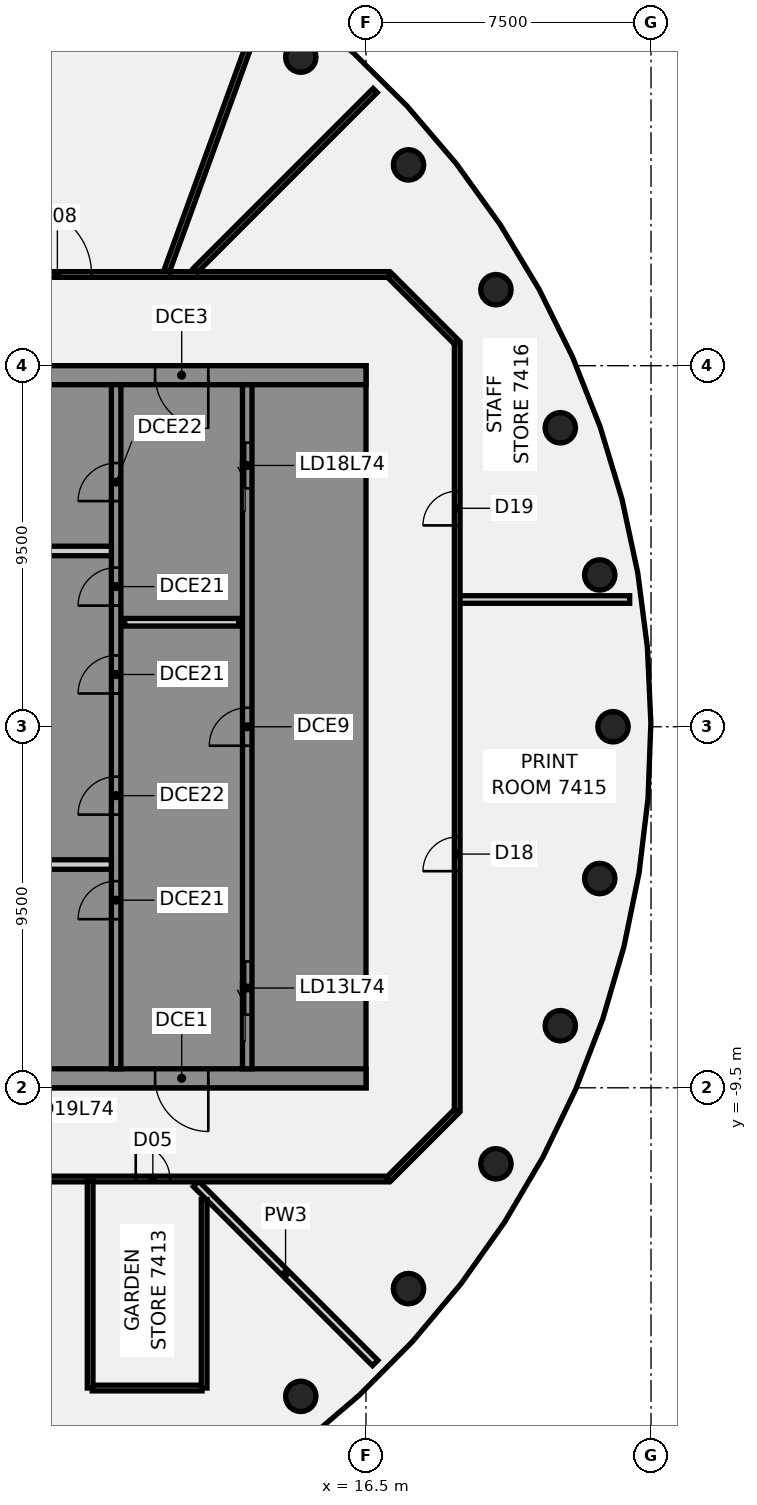
"""IFC4 building model, lengths in metres.
Left out: names, types, materials, properties, quantities, classifications, styles, units other than length and angle.
Written with IfcOpenShell. Run it as: python <this file> out.ifc"""

import sys

from ifc_helpers import new_model, si_unit, direction, frame, frame_2d, origin, origin_2d, place, context, subcontext, project, spatial, polyline, rectangle, circle, outline, extrude, element, fill, save


model = new_model("IFC4")
c1 = context("Model", 3, precision=1e-05, world=origin(), true_north=direction((0.0, 1.0)))
c2 = subcontext(c1, "Body", "Model", "MODEL_VIEW")
j1 = project(units=[si_unit("LENGTHUNIT", "METRE"), si_unit("PLANEANGLEUNIT", "RADIAN")], contexts=[c1])
p1 = place(None, origin())
s1 = spatial("IfcSite", under=j1, at=p1, CompositionType="ELEMENT")
p2 = place(p1, origin())
s2 = spatial("IfcBuilding", under=s1, at=p2, CompositionType="ELEMENT")
p3 = place(p2, frame((0.0, 0.0, 299.4)))
s3 = spatial("IfcBuildingStorey", under=s2, at=p3, CompositionType="ELEMENT", Elevation=299.4)
for number, where, z_axis, x_axis in (
    (1, (23.0, 0.0, -0.25), (0.0, 0.0, 1.0), (1.0, 0.0, 0.0)),
    (2, (22.651, 3.994, -0.25), (0.0, 0.0, 1.0), (1.0, 0.0, 0.0)),
    (3, (21.613, 7.866, -0.25), (0.0, 0.0, 1.0), (1.0, 0.0, 0.0)),
    (4, (19.919, 11.5, -0.25), (0.0, 0.0, 1.0), (1.0, 0.0, 0.0)),
    (5, (17.619, 14.784, -0.25), (0.0, 0.0, 1.0), (1.0, 0.0, 0.0)),
    (6, (14.784, 17.619, -0.25), (0.0, 0.0, 1.0), (1.0, 0.0, 0.0)),
    (7, (14.784, -17.619, -0.25), (0.0, 0.0, 1.0), (1.0, 0.0, 0.0)),
    (8, (17.619, -14.784, -0.25), (0.0, 0.0, 1.0), (1.0, 0.0, 0.0)),
    (9, (19.919, -11.5, -0.25), (0.0, 0.0, 1.0), (1.0, 0.0, 0.0)),
    (10, (21.613, -7.866, -0.25), (0.0, 0.0, 1.0), (1.0, 0.0, 0.0)),
    (11, (22.651, -3.994, -0.25), (0.0, 0.0, 1.0), (1.0, 0.0, 0.0)),
):
    element("IfcColumn", number, at=place(p3, frame(where, z_axis=z_axis, x_axis=x_axis)), inside=s3, PredefinedType="COLUMN", context=c2, shape_type="SweptSolid", body=[
        extrude(circle(Radius=0.4, at=origin_2d()), origin(), (0.0, 0.0, 1.0), 6.07),
    ])
p4 = place(p3, frame((12.027, -12.027, 0.0), z_axis=(0.0, 0.0, 1.0), x_axis=(0.707106781187, -0.707106781187, 0.0)))
e12 = element("IfcWall", 12, at=p4, inside=s3, PredefinedType="PARTITIONING", context=c2, shape_type="SweptSolid", body=[
    extrude(rectangle(XDim=6.665, YDim=0.2, at=frame_2d((3.333, 0.0))), origin(), (0.0, 0.0, 1.0), 5.02),
])
p5 = place(p3, frame((17.128, 11.872, 0.0), z_axis=(0.0, 0.0, 1.0), x_axis=(0.707106781187, -0.707106781187, 0.0)))
e13 = element("IfcWall", 13, at=p5, inside=s3, PredefinedType="PARTITIONING", context=c2, shape_type="SweptSolid", body=[
    extrude(rectangle(XDim=2.465, YDim=0.15, at=frame_2d((1.232, 0.0))), origin(), (0.0, 0.0, 1.0), 5.02),
])
p6 = place(p3, frame((-17.1, -11.9, 0.0), z_axis=(0.0, 0.0, 1.0), x_axis=(1.0, 0.0, 0.0)))
e14 = element("IfcWall", 14, at=p6, inside=s3, PredefinedType="PARTITIONING", context=c2, shape_type="SweptSolid", body=[
    extrude(rectangle(XDim=34.165, YDim=0.15, at=frame_2d((17.083, 0.0))), origin(), (0.0, 0.0, 1.0), 5.02),
])
p7 = place(p6, frame((7.45, 0.0, 0.0)))
e15 = element("IfcOpeningElement", 15, at=p7, cuts=e14, PredefinedType="OPENING", context=c2, shape_type="SweptSolid", body=[
    extrude(rectangle(XDim=1.8, YDim=2.1, at=frame_2d((0.9, 1.05))), frame((0.0, 0.085, 0.0), z_axis=(0.0, -1.0, 0.0), x_axis=(1.0, 0.0, 0.0)), (0.0, 0.0, 1.0), 0.17),
])
p8 = place(p6, frame((27.541, 0.0, 0.0)))
e16 = element("IfcOpeningElement", 16, at=p8, cuts=e14, PredefinedType="OPENING", context=c2, shape_type="SweptSolid", body=[
    extrude(rectangle(XDim=0.9, YDim=2.1, at=frame_2d((0.45, 1.05))), frame((0.0, 0.085, 0.0), z_axis=(0.0, -1.0, 0.0), x_axis=(1.0, 0.0, 0.0)), (0.0, 0.0, 1.0), 0.17),
])
p9 = place(p6, frame((18.909, 0.0, 0.0)))
e17 = element("IfcOpeningElement", 17, at=p9, cuts=e14, PredefinedType="OPENING", context=c2, shape_type="SweptSolid", body=[
    extrude(rectangle(XDim=1.8, YDim=2.1, at=frame_2d((0.9, 1.05))), frame((0.0, 0.085, 0.0), z_axis=(0.0, -1.0, 0.0), x_axis=(1.0, 0.0, 0.0)), (0.0, 0.0, 1.0), 0.17),
])
p10 = place(p6, frame((2.85, 0.0, 0.0)))
e18 = element("IfcOpeningElement", 18, at=p10, cuts=e14, PredefinedType="OPENING", context=c2, shape_type="SweptSolid", body=[
    extrude(rectangle(XDim=0.9, YDim=2.1, at=frame_2d((0.45, 1.05))), frame((0.0, 0.085, 0.0), z_axis=(0.0, -1.0, 0.0), x_axis=(1.0, 0.0, 0.0)), (0.0, 0.0, 1.0), 0.17),
])
p11 = place(p3, frame((-17.065, 11.9, 0.0), z_axis=(0.0, 0.0, 1.0), x_axis=(1.0, 0.0, 0.0)))
e19 = element("IfcWall", 19, at=p11, inside=s3, PredefinedType="PARTITIONING", context=c2, shape_type="SweptSolid", body=[
    extrude(rectangle(XDim=34.165, YDim=0.15, at=frame_2d((17.083, 0.0))), origin(), (0.0, 0.0, 1.0), 5.02),
])
p12 = place(p11, frame((24.544, 0.0, 0.0)))
e20 = element("IfcOpeningElement", 20, at=p12, cuts=e19, PredefinedType="OPENING", context=c2, shape_type="SweptSolid", body=[
    extrude(rectangle(XDim=1.8, YDim=2.1, at=frame_2d((0.9, 1.05))), frame((0.0, 0.085, 0.0), z_axis=(0.0, -1.0, 0.0), x_axis=(1.0, 0.0, 0.0)), (0.0, 0.0, 1.0), 0.17),
])
p13 = place(p11, frame((15.365, 0.0, 0.0)))
e21 = element("IfcOpeningElement", 21, at=p13, cuts=e19, PredefinedType="OPENING", context=c2, shape_type="SweptSolid", body=[
    extrude(rectangle(XDim=1.8, YDim=2.1, at=frame_2d((0.9, 1.05))), frame((0.0, 0.085, 0.0), z_axis=(0.0, -1.0, 0.0), x_axis=(1.0, 0.0, 0.0)), (0.0, 0.0, 1.0), 0.17),
])
p14 = place(p3, frame((9.296, -17.4, 0.0), z_axis=(0.0, 0.0, 1.0), x_axis=(1.0, 0.0, 0.0)))
e22 = element("IfcWall", 22, at=p14, inside=s3, PredefinedType="PARTITIONING", context=c2, shape_type="SweptSolid", body=[
    extrude(rectangle(XDim=2.89, YDim=0.15, at=frame_2d((1.445, 0.0))), origin(), (0.0, 0.0, 1.0), 5.02),
])
p15 = place(p3, frame((18.955, 3.348, 0.0), z_axis=(0.0, 0.0, 1.0), x_axis=(1.0, 0.0, 0.0)))
e23 = element("IfcWall", 23, at=p15, inside=s3, PredefinedType="PARTITIONING", context=c2, shape_type="SweptSolid", body=[
    extrude(rectangle(XDim=4.484, YDim=0.2, at=frame_2d((2.242, 0.0))), origin(), (0.0, 0.0, 1.0), 5.02),
])
p16 = place(p3, frame((12.01, 12.01, 0.0), z_axis=(0.0, 0.0, 1.0), x_axis=(0.707106781187, 0.707106781187, 0.0)))
e24 = element("IfcWall", 24, at=p16, inside=s3, PredefinedType="PARTITIONING", context=c2, shape_type="SweptSolid", body=[
    extrude(rectangle(XDim=6.691, YDim=0.15, at=frame_2d((3.345, 0.0))), origin(), (0.0, 0.0, 1.0), 5.02),
])
p17 = place(p3, frame((17.1, -11.9, 0.0), z_axis=(0.0, 0.0, 1.0), x_axis=(0.707106781187, 0.707106781187, 0.0)))
e25 = element("IfcWall", 25, at=p17, inside=s3, PredefinedType="PARTITIONING", context=c2, shape_type="SweptSolid", body=[
    extrude(rectangle(XDim=2.505, YDim=0.15, at=frame_2d((1.253, 0.0))), origin(), (0.0, 0.0, 1.0), 5.02),
])
p18 = place(p3, frame((11.254, 11.985, 0.0), z_axis=(0.0, 0.0, 1.0), x_axis=(0.341891443356, 0.939739453764, 0.0)))
e26 = element("IfcWall", 26, at=p18, inside=s3, PredefinedType="PARTITIONING", context=c2, shape_type="SweptSolid", body=[
    extrude(rectangle(XDim=7.662, YDim=0.15, at=frame_2d((3.831, 0.0))), origin(), (0.0, 0.0, 1.0), 5.02),
])
p19 = place(p3, frame((9.241, -17.4, 0.0), z_axis=(0.0, 0.0, 1.0), x_axis=(0.0, 1.0, 0.0)))
e27 = element("IfcWall", 27, at=p19, inside=s3, PredefinedType="PARTITIONING", context=c2, shape_type="SweptSolid", body=[
    extrude(rectangle(XDim=5.445, YDim=0.15, at=frame_2d((2.722, 0.0))), origin(), (0.0, 0.0, 1.0), 5.02),
])
p20 = place(p3, frame((12.241, -17.4, 0.0), z_axis=(0.0, 0.0, 1.0), x_axis=(0.0, 1.0, 0.0)))
e28 = element("IfcWall", 28, at=p20, inside=s3, PredefinedType="PARTITIONING", context=c2, shape_type="SweptSolid", body=[
    extrude(rectangle(XDim=4.959, YDim=0.15, at=frame_2d((2.479, 0.0))), origin(), (0.0, 0.0, 1.0), 5.02),
])
p21 = place(p3, frame((18.9, -10.1, 0.0), z_axis=(0.0, 0.0, 1.0), x_axis=(0.0, 1.0, 0.0)))
e29 = element("IfcWall", 29, at=p21, inside=s3, PredefinedType="PARTITIONING", context=c2, shape_type="SweptSolid", body=[
    extrude(rectangle(XDim=20.2, YDim=0.15, at=frame_2d((10.1, 0.0))), origin(), (0.0, 0.0, 1.0), 5.02),
])
p22 = place(p21, frame((6.3, 0.0, 0.0)))
e30 = element("IfcOpeningElement", 30, at=p22, cuts=e29, PredefinedType="OPENING", context=c2, shape_type="SweptSolid", body=[
    extrude(rectangle(XDim=0.9, YDim=2.1, at=frame_2d((0.45, 1.05))), frame((0.0, 0.085, 0.0), z_axis=(0.0, -1.0, 0.0), x_axis=(1.0, 0.0, 0.0)), (0.0, 0.0, 1.0), 0.17),
])
p23 = place(p21, frame((15.398, 0.0, 0.0)))
e31 = element("IfcOpeningElement", 31, at=p23, cuts=e29, PredefinedType="OPENING", context=c2, shape_type="SweptSolid", body=[
    extrude(rectangle(XDim=0.9, YDim=2.1, at=frame_2d((0.45, 1.05))), frame((0.0, 0.085, 0.0), z_axis=(0.0, -1.0, 0.0), x_axis=(1.0, 0.0, 0.0)), (0.0, 0.0, 1.0), 0.17),
])
p24 = place(p3, frame((16.5, -9.25, 0.0), z_axis=(0.0, 0.0, 1.0), x_axis=(-1.0, 0.0, 0.0)))
e32 = element("IfcWall", 32, at=p24, inside=s3, PredefinedType="SHEAR", context=c2, shape_type="SweptSolid", body=[
    extrude(rectangle(XDim=13.0, YDim=0.5, at=frame_2d((6.5, 0.0))), origin(), (0.0, 0.0, 1.0), 5.82),
])
p25 = place(p24, frame((4.15, 0.0, 0.0)))
e33 = element("IfcOpeningElement", 33, at=p25, cuts=e32, PredefinedType="OPENING", context=c2, shape_type="SweptSolid", body=[
    extrude(rectangle(XDim=1.4, YDim=2.1, at=frame_2d((0.7, 1.05))), frame((0.0, 0.26, 0.0), z_axis=(0.0, -1.0, 0.0), x_axis=(1.0, 0.0, 0.0)), (0.0, 0.0, 1.0), 0.52),
])
p26 = place(p24, frame((10.125, 0.0, 0.0)))
e34 = element("IfcOpeningElement", 34, at=p26, cuts=e32, PredefinedType="OPENING", context=c2, shape_type="SweptSolid", body=[
    extrude(rectangle(XDim=1.4, YDim=2.1, at=frame_2d((0.7, 1.05))), frame((0.0, 0.26, 0.0), z_axis=(0.0, -1.0, 0.0), x_axis=(1.0, 0.0, 0.0)), (0.0, 0.0, 1.0), 0.52),
])
p27 = place(p3, frame((16.5, 9.25, 0.0), z_axis=(0.0, 0.0, 1.0), x_axis=(-1.0, 0.0, 0.0)))
e35 = element("IfcWall", 35, at=p27, inside=s3, PredefinedType="SHEAR", context=c2, shape_type="SweptSolid", body=[
    extrude(rectangle(XDim=13.0, YDim=0.5, at=frame_2d((6.5, 0.0))), origin(), (0.0, 0.0, 1.0), 5.82),
])
p28 = place(p27, frame((4.15, 0.0, 0.0)))
e36 = element("IfcOpeningElement", 36, at=p28, cuts=e35, PredefinedType="OPENING", context=c2, shape_type="SweptSolid", body=[
    extrude(rectangle(XDim=1.4, YDim=2.1, at=frame_2d((0.7, 1.05))), frame((0.0, 0.26, 0.0), z_axis=(0.0, -1.0, 0.0), x_axis=(1.0, 0.0, 0.0)), (0.0, 0.0, 1.0), 0.52),
])
p29 = place(p3, frame((13.15, 2.75, 0.0), z_axis=(0.0, 0.0, 1.0), x_axis=(-1.0, 0.0, 0.0)))
e37 = element("IfcWall", 37, at=p29, inside=s3, PredefinedType="PARTITIONING", context=c2, shape_type="SweptSolid", body=[
    extrude(rectangle(XDim=3.0, YDim=0.2, at=frame_2d((1.5, 0.0))), origin(), (0.0, 0.0, 1.0), 5.82),
])
p30 = place(p3, origin())
e38 = element("IfcWall", 38, at=p30, inside=s3, PredefinedType="SHEAR", context=c2, shape_type="SweptSolid", body=[
    extrude(outline(polyline([(13.5, -8.125), (13.5, -9.0), (16.0, -9.0), (16.5, -9.0), (16.5, 9.0), (16.0, 9.0), (13.5, 9.0), (13.5, 8.125), (16.0, 8.125), (16.0, 5.625), (13.5, 5.625), (13.5, 5.375), (16.0, 5.375), (16.0, -5.375), (13.5, -5.375), (13.5, -5.625), (16.0, -5.625), (16.0, -8.125), (13.5, -8.125)])), origin(), (0.0, 0.0, 1.0), 5.82),
])
p31 = place(p3, origin())
e39 = element("IfcWall", 39, at=p31, inside=s3, PredefinedType="SHEAR", context=c2, shape_type="SweptSolid", body=[
    extrude(outline(polyline([(9.8, -5.625), (9.8, -5.375), (7.5, -5.375), (7.5, 8.125), (9.8, 8.125), (9.8, 9.0), (7.5, 9.0), (7.25, 9.0), (7.25, -5.625), (7.5, -5.625), (9.8, -5.625)])), origin(), (0.0, 0.0, 1.0), 5.82),
])
p32 = place(p3, origin())
e40 = element("IfcWall", 40, at=p32, inside=s3, PredefinedType="SHEAR", context=c2, shape_type="SweptSolid", body=[
    extrude(outline(polyline([(7.5, -8.125), (7.5, -9.0), (9.8, -9.0), (9.8, -8.125), (9.8, -5.625), (9.55, -5.625), (9.55, -8.125), (7.5, -8.125)])), origin(), (0.0, 0.0, 1.0), 5.82),
])
p33 = place(p3, frame((13.375, -9.0, 0.0), z_axis=(0.0, 0.0, 1.0), x_axis=(0.0, 1.0, 0.0)))
e41 = element("IfcWall", 41, at=p33, inside=s3, PredefinedType="SHEAR", context=c2, shape_type="SweptSolid", body=[
    extrude(rectangle(XDim=18.0, YDim=0.25, at=frame_2d((9.0, 0.0))), origin(), (0.0, 0.0, 1.0), 5.82),
])
p34 = place(p33, frame((1.425, 0.0, 0.0)))
e42 = element("IfcOpeningElement", 42, at=p34, cuts=e41, PredefinedType="OPENING", context=c2, shape_type="SweptSolid", body=[
    extrude(rectangle(XDim=1.4, YDim=2.1, at=frame_2d((0.7, 1.05))), frame((0.0, 0.135, 0.0), z_axis=(0.0, -1.0, 0.0), x_axis=(1.0, 0.0, 0.0)), (0.0, 0.0, 1.0), 0.27),
])
p35 = place(p33, frame((15.275, 0.0, 0.0)))
e43 = element("IfcOpeningElement", 43, at=p35, cuts=e41, PredefinedType="OPENING", context=c2, shape_type="SweptSolid", body=[
    extrude(rectangle(XDim=1.2, YDim=2.1, at=frame_2d((0.6, 1.05))), frame((0.0, 0.135, 0.0), z_axis=(0.0, -1.0, 0.0), x_axis=(1.0, 0.0, 0.0)), (0.0, 0.0, 1.0), 0.27),
])
p36 = place(p33, frame((8.5, 0.0, 0.0)))
e44 = element("IfcOpeningElement", 44, at=p36, cuts=e41, PredefinedType="OPENING", context=c2, shape_type="SweptSolid", body=[
    extrude(rectangle(XDim=1.0, YDim=2.1, at=frame_2d((0.5, 1.05))), frame((0.0, 0.135, 0.0), z_axis=(0.0, -1.0, 0.0), x_axis=(1.0, 0.0, 0.0)), (0.0, 0.0, 1.0), 0.27),
])
p37 = place(p3, frame((9.925, -9.0, 0.0), z_axis=(0.0, 0.0, 1.0), x_axis=(0.0, 1.0, 0.0)))
e45 = element("IfcWall", 45, at=p37, inside=s3, PredefinedType="SHEAR", context=c2, shape_type="SweptSolid", body=[
    extrude(rectangle(XDim=18.0, YDim=0.25, at=frame_2d((9.0, 0.0))), origin(), (0.0, 0.0, 1.0), 5.82),
])
p38 = place(p37, frame((3.938, 0.0, 0.0)))
e46 = element("IfcOpeningElement", 46, at=p38, cuts=e45, PredefinedType="OPENING", context=c2, shape_type="SweptSolid", body=[
    extrude(rectangle(XDim=1.0, YDim=2.1, at=frame_2d((0.5, 1.05))), frame((0.0, 0.135, 0.0), z_axis=(0.0, -1.0, 0.0), x_axis=(1.0, 0.0, 0.0)), (0.0, 0.0, 1.0), 0.27),
])
p39 = place(p37, frame((6.688, 0.0, 0.0)))
e47 = element("IfcOpeningElement", 47, at=p39, cuts=e45, PredefinedType="OPENING", context=c2, shape_type="SweptSolid", body=[
    extrude(rectangle(XDim=1.0, YDim=2.1, at=frame_2d((0.5, 1.05))), frame((0.0, 0.135, 0.0), z_axis=(0.0, -1.0, 0.0), x_axis=(1.0, 0.0, 0.0)), (0.0, 0.0, 1.0), 0.27),
])
p40 = place(p37, frame((9.875, 0.0, 0.0)))
e48 = element("IfcOpeningElement", 48, at=p40, cuts=e45, PredefinedType="OPENING", context=c2, shape_type="SweptSolid", body=[
    extrude(rectangle(XDim=1.0, YDim=2.1, at=frame_2d((0.5, 1.05))), frame((0.0, 0.135, 0.0), z_axis=(0.0, -1.0, 0.0), x_axis=(1.0, 0.0, 0.0)), (0.0, 0.0, 1.0), 0.27),
])
p41 = place(p37, frame((12.188, 0.0, 0.0)))
e49 = element("IfcOpeningElement", 49, at=p41, cuts=e45, PredefinedType="OPENING", context=c2, shape_type="SweptSolid", body=[
    extrude(rectangle(XDim=1.0, YDim=2.1, at=frame_2d((0.5, 1.05))), frame((0.0, 0.135, 0.0), z_axis=(0.0, -1.0, 0.0), x_axis=(1.0, 0.0, 0.0)), (0.0, 0.0, 1.0), 0.27),
])
p42 = place(p37, frame((14.938, 0.0, 0.0)))
e50 = element("IfcOpeningElement", 50, at=p42, cuts=e45, PredefinedType="OPENING", context=c2, shape_type="SweptSolid", body=[
    extrude(rectangle(XDim=1.0, YDim=2.1, at=frame_2d((0.5, 1.05))), frame((0.0, 0.135, 0.0), z_axis=(0.0, -1.0, 0.0), x_axis=(1.0, 0.0, 0.0)), (0.0, 0.0, 1.0), 0.27),
])
for number, where, z_axis, x_axis in (
    (51, (9.8, -3.625, 0.0), (0.0, 0.0, 1.0), (-1.0, 0.0, 0.0)),
    (52, (9.8, 4.625, 0.0), (0.0, 0.0, 1.0), (-1.0, 0.0, 0.0)),
):
    element("IfcWall", number, at=place(p3, frame(where, z_axis=z_axis, x_axis=x_axis)), inside=s3, PredefinedType="PARTITIONING", context=c2, shape_type="SweptSolid", body=[
        extrude(rectangle(XDim=2.3, YDim=0.25, at=frame_2d((1.15, 0.0))), origin(), (0.0, 0.0, 1.0), 5.82),
    ])
p43 = place(p8, frame((0.9, 0.0, 0.0), z_axis=(0.0, 0.0, 1.0), x_axis=(-1.0, 0.0, 0.0)))
e53 = element("IfcDoor", 53, at=p43, inside=s3, OperationType="SINGLE_SWING_RIGHT", PredefinedType="DOOR", context=c2, shape_type="SweptSolid", body=[
    extrude(rectangle(XDim=0.9, YDim=2.1, at=frame_2d((0.45, 1.05))), frame((0.0, 0.025, 0.0), z_axis=(0.0, -1.0, 0.0), x_axis=(1.0, 0.0, 0.0)), (0.0, 0.0, 1.0), 0.05),
])
fill(e16, e53)
p44 = place(p12, frame((1.8, 0.0, 0.0), z_axis=(0.0, 0.0, 1.0), x_axis=(-1.0, 0.0, 0.0)))
e54 = element("IfcDoor", 54, at=p44, inside=s3, OperationType="DOUBLE_DOOR_SINGLE_SWING", PredefinedType="DOOR", context=c2, shape_type="SweptSolid", body=[
    extrude(rectangle(XDim=1.8, YDim=2.1, at=frame_2d((0.9, 1.05))), frame((0.0, 0.025, 0.0), z_axis=(0.0, -1.0, 0.0), x_axis=(1.0, 0.0, 0.0)), (0.0, 0.0, 1.0), 0.05),
])
fill(e20, e54)
p45 = place(p22, frame((0.9, 0.0, 0.0), z_axis=(0.0, 0.0, 1.0), x_axis=(-1.0, 0.0, 0.0)))
e55 = element("IfcDoor", 55, at=p45, inside=s3, OperationType="SINGLE_SWING_LEFT", PredefinedType="DOOR", context=c2, shape_type="SweptSolid", body=[
    extrude(rectangle(XDim=0.9, YDim=2.1, at=frame_2d((0.45, 1.05))), frame((0.0, 0.025, 0.0), z_axis=(0.0, -1.0, 0.0), x_axis=(1.0, 0.0, 0.0)), (0.0, 0.0, 1.0), 0.05),
])
fill(e30, e55)
p46 = place(p23, frame((0.9, 0.0, 0.0), z_axis=(0.0, 0.0, 1.0), x_axis=(-1.0, 0.0, 0.0)))
e56 = element("IfcDoor", 56, at=p46, inside=s3, OperationType="SINGLE_SWING_RIGHT", PredefinedType="DOOR", context=c2, shape_type="SweptSolid", body=[
    extrude(rectangle(XDim=0.9, YDim=2.1, at=frame_2d((0.45, 1.05))), frame((0.0, 0.025, 0.0), z_axis=(0.0, -1.0, 0.0), x_axis=(1.0, 0.0, 0.0)), (0.0, 0.0, 1.0), 0.05),
])
fill(e31, e56)
p47 = place(p25, origin())
e57 = element("IfcDoor", 57, at=p47, inside=s3, OperationType="SINGLE_SWING_LEFT", PredefinedType="DOOR", context=c2, shape_type="SweptSolid", body=[
    extrude(rectangle(XDim=1.4, YDim=2.1, at=frame_2d((0.7, 1.05))), frame((0.0, 0.025, 0.0), z_axis=(0.0, -1.0, 0.0), x_axis=(1.0, 0.0, 0.0)), (0.0, 0.0, 1.0), 0.05),
])
fill(e33, e57)
p48 = place(p28, origin())
e58 = element("IfcDoor", 58, at=p48, inside=s3, OperationType="SINGLE_SWING_LEFT", PredefinedType="DOOR", context=c2, shape_type="SweptSolid", body=[
    extrude(rectangle(XDim=1.4, YDim=2.1, at=frame_2d((0.7, 1.05))), frame((0.0, 0.025, 0.0), z_axis=(0.0, -1.0, 0.0), x_axis=(1.0, 0.0, 0.0)), (0.0, 0.0, 1.0), 0.05),
])
fill(e36, e58)
p49 = place(p34, origin())
e59 = element("IfcDoor", 59, at=p49, inside=s3, OperationType="SLIDING_TO_LEFT", PredefinedType="DOOR", context=c2, shape_type="SweptSolid", body=[
    extrude(rectangle(XDim=1.4, YDim=2.1, at=frame_2d((0.7, 1.05))), frame((0.0, 0.025, 0.0), z_axis=(0.0, -1.0, 0.0), x_axis=(1.0, 0.0, 0.0)), (0.0, 0.0, 1.0), 0.05),
])
fill(e42, e59)
p50 = place(p35, origin())
e60 = element("IfcDoor", 60, at=p50, inside=s3, OperationType="SLIDING_TO_LEFT", PredefinedType="DOOR", context=c2, shape_type="SweptSolid", body=[
    extrude(rectangle(XDim=1.2, YDim=2.1, at=frame_2d((0.6, 1.05))), frame((0.0, 0.025, 0.0), z_axis=(0.0, -1.0, 0.0), x_axis=(1.0, 0.0, 0.0)), (0.0, 0.0, 1.0), 0.05),
])
fill(e43, e60)
p51 = place(p36, origin())
e61 = element("IfcDoor", 61, at=p51, inside=s3, OperationType="SINGLE_SWING_LEFT", PredefinedType="DOOR", context=c2, shape_type="SweptSolid", body=[
    extrude(rectangle(XDim=1.0, YDim=2.1, at=frame_2d((0.5, 1.05))), frame((0.0, 0.025, 0.0), z_axis=(0.0, -1.0, 0.0), x_axis=(1.0, 0.0, 0.0)), (0.0, 0.0, 1.0), 0.05),
])
fill(e44, e61)
p52 = place(p38, origin())
e62 = element("IfcDoor", 62, at=p52, inside=s3, OperationType="SINGLE_SWING_LEFT", PredefinedType="DOOR", context=c2, shape_type="SweptSolid", body=[
    extrude(rectangle(XDim=1.0, YDim=2.1, at=frame_2d((0.5, 1.05))), frame((0.0, 0.025, 0.0), z_axis=(0.0, -1.0, 0.0), x_axis=(1.0, 0.0, 0.0)), (0.0, 0.0, 1.0), 0.05),
])
fill(e46, e62)
p53 = place(p39, origin())
e63 = element("IfcDoor", 63, at=p53, inside=s3, OperationType="SINGLE_SWING_LEFT", PredefinedType="DOOR", context=c2, shape_type="SweptSolid", body=[
    extrude(rectangle(XDim=1.0, YDim=2.1, at=frame_2d((0.5, 1.05))), frame((0.0, 0.025, 0.0), z_axis=(0.0, -1.0, 0.0), x_axis=(1.0, 0.0, 0.0)), (0.0, 0.0, 1.0), 0.05),
])
fill(e47, e63)
p54 = place(p40, origin())
e64 = element("IfcDoor", 64, at=p54, inside=s3, OperationType="SINGLE_SWING_LEFT", PredefinedType="DOOR", context=c2, shape_type="SweptSolid", body=[
    extrude(rectangle(XDim=1.0, YDim=2.1, at=frame_2d((0.5, 1.05))), frame((0.0, 0.025, 0.0), z_axis=(0.0, -1.0, 0.0), x_axis=(1.0, 0.0, 0.0)), (0.0, 0.0, 1.0), 0.05),
])
fill(e48, e64)
p55 = place(p41, origin())
e65 = element("IfcDoor", 65, at=p55, inside=s3, OperationType="SINGLE_SWING_LEFT", PredefinedType="DOOR", context=c2, shape_type="SweptSolid", body=[
    extrude(rectangle(XDim=1.0, YDim=2.1, at=frame_2d((0.5, 1.05))), frame((0.0, 0.025, 0.0), z_axis=(0.0, -1.0, 0.0), x_axis=(1.0, 0.0, 0.0)), (0.0, 0.0, 1.0), 0.05),
])
fill(e49, e65)
p56 = place(p42, origin())
e66 = element("IfcDoor", 66, at=p56, inside=s3, OperationType="SINGLE_SWING_LEFT", PredefinedType="DOOR", context=c2, shape_type="SweptSolid", body=[
    extrude(rectangle(XDim=1.0, YDim=2.1, at=frame_2d((0.5, 1.05))), frame((0.0, 0.025, 0.0), z_axis=(0.0, -1.0, 0.0), x_axis=(1.0, 0.0, 0.0)), (0.0, 0.0, 1.0), 0.05),
])
fill(e50, e66)
save(model, sys.argv[1])
